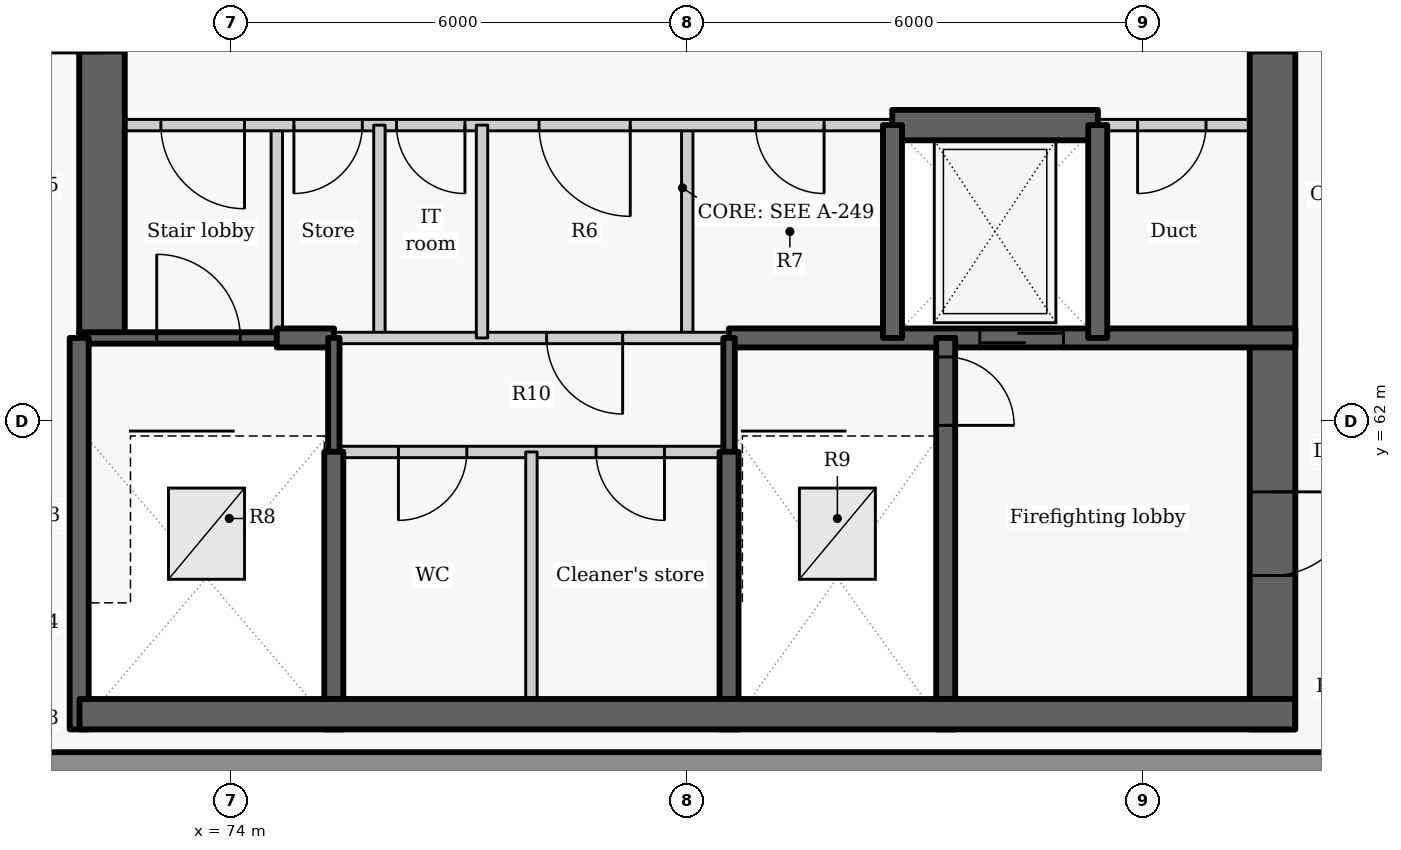
"""IFC4 building model, lengths in metres.
Left out: names, types, materials, properties, quantities, classifications, styles, units other than length and angle.
Written with IfcOpenShell. Run it as: python <this file> out.ifc"""

import sys

from ifc_helpers import new_model, si_unit, direction, frame, frame_2d, origin, origin_2d, place, context, subcontext, project, spatial, rectangle, extrude, element, fill, save


model = new_model("IFC4")
c1 = context("Model", 3, precision=1e-05, world=origin(), true_north=direction((0.0, 1.0)))
c2 = subcontext(c1, "Body", "Model", "MODEL_VIEW")
j1 = project(units=[si_unit("LENGTHUNIT", "METRE"), si_unit("PLANEANGLEUNIT", "RADIAN")], contexts=[c1])
p1 = place(None, origin())
s1 = spatial("IfcSite", under=j1, at=p1, CompositionType="ELEMENT")
p2 = place(p1, origin())
s2 = spatial("IfcBuilding", under=s1, at=p2, CompositionType="ELEMENT")
p3 = place(p2, frame((0.0, 0.0, 286.8)))
s3 = spatial("IfcBuildingStorey", under=s2, at=p3, CompositionType="ELEMENT", Elevation=286.8)
p4 = place(p3, frame((70.451, 57.5, 0.0), z_axis=(0.0, 0.0, 1.0), x_axis=(1.0, 0.0, 0.0)))
e1 = element("IfcWall", 1, at=p4, inside=s3, PredefinedType="SOLIDWALL", context=c2, shape_type="SweptSolid", body=[
    extrude(rectangle(XDim=19.093, YDim=0.3, at=frame_2d((9.546, 0.0))), origin(), (0.0, 0.0, 1.0), 2.725),
])
p5 = place(p3, frame((74.6, 63.1, 0.0), z_axis=(0.0, 0.0, 1.0), x_axis=(0.0, 1.0, 0.0)))
e2 = element("IfcWall", 2, at=p5, inside=s3, PredefinedType="PARTITIONING", context=c2, shape_type="SweptSolid", body=[
    extrude(rectangle(XDim=2.8, YDim=0.15, at=frame_2d((1.4, 0.0))), origin(), (0.0, 0.0, 1.0), 3.325),
])
p6 = place(p3, frame((72.3, 63.1, -0.275), z_axis=(0.0, 0.0, 1.0), x_axis=(0.0, 1.0, 0.0)))
e3 = element("IfcWall", 3, at=p6, inside=s3, PredefinedType="SHEAR", context=c2, shape_type="SweptSolid", body=[
    extrude(rectangle(XDim=9.1, YDim=0.6, at=frame_2d((4.55, 0.0))), origin(), (0.0, 0.0, 1.0), 3.6),
])
p7 = place(p6, frame((3.75, 0.0, 0.275)))
e4 = element("IfcOpeningElement", 4, at=p7, cuts=e3, PredefinedType="OPENING", context=c2, shape_type="SweptSolid", body=[
    extrude(rectangle(XDim=1.5, YDim=2.1, at=frame_2d((0.75, 1.05))), frame((0.0, 0.31, 0.0), z_axis=(0.0, -1.0, 0.0), x_axis=(1.0, 0.0, 0.0)), (0.0, 0.0, 1.0), 0.62),
])
p8 = place(p3, frame((80.0, 63.1, 0.0), z_axis=(0.0, 0.0, 1.0), x_axis=(0.0, 1.0, 0.0)))
e5 = element("IfcWall", 5, at=p8, inside=s3, PredefinedType="PARTITIONING", context=c2, shape_type="SweptSolid", body=[
    extrude(rectangle(XDim=2.8, YDim=0.15, at=frame_2d((1.4, 0.0))), origin(), (0.0, 0.0, 1.0), 3.325),
])
p9 = place(p3, frame((82.703, 65.9, 0.0), z_axis=(0.0, 0.0, 1.0), x_axis=(-1.0, 0.0, 0.0)))
e6 = element("IfcWall", 6, at=p9, inside=s3, PredefinedType="PARTITIONING", context=c2, shape_type="SweptSolid", body=[
    extrude(rectangle(XDim=10.703, YDim=0.15, at=frame_2d((5.352, 0.0))), origin(), (0.0, 0.0, 1.0), 3.325),
])
p10 = place(p9, frame((8.528, 0.0, 0.0)))
e7 = element("IfcOpeningElement", 7, at=p10, cuts=e6, PredefinedType="OPENING", context=c2, shape_type="SweptSolid", body=[
    extrude(rectangle(XDim=1.1, YDim=2.1, at=frame_2d((0.55, 1.05))), frame((0.0, 0.085, 0.0), z_axis=(0.0, -1.0, 0.0), x_axis=(1.0, 0.0, 0.0)), (0.0, 0.0, 1.0), 0.17),
])
p11 = place(p9, frame((6.978, 0.0, 0.0)))
e8 = element("IfcOpeningElement", 8, at=p11, cuts=e6, PredefinedType="OPENING", context=c2, shape_type="SweptSolid", body=[
    extrude(rectangle(XDim=0.9, YDim=2.1, at=frame_2d((0.45, 1.05))), frame((0.0, 0.085, 0.0), z_axis=(0.0, -1.0, 0.0), x_axis=(1.0, 0.0, 0.0)), (0.0, 0.0, 1.0), 0.17),
])
p12 = place(p9, frame((5.628, 0.0, 0.0)))
e9 = element("IfcOpeningElement", 9, at=p12, cuts=e6, PredefinedType="OPENING", context=c2, shape_type="SweptSolid", body=[
    extrude(rectangle(XDim=0.9, YDim=2.1, at=frame_2d((0.45, 1.05))), frame((0.0, 0.085, 0.0), z_axis=(0.0, -1.0, 0.0), x_axis=(1.0, 0.0, 0.0)), (0.0, 0.0, 1.0), 0.17),
])
p13 = place(p9, frame((3.453, 0.0, 0.0)))
e10 = element("IfcOpeningElement", 10, at=p13, cuts=e6, PredefinedType="OPENING", context=c2, shape_type="SweptSolid", body=[
    extrude(rectangle(XDim=1.2, YDim=2.1, at=frame_2d((0.6, 1.05))), frame((0.0, 0.085, 0.0), z_axis=(0.0, -1.0, 0.0), x_axis=(1.0, 0.0, 0.0)), (0.0, 0.0, 1.0), 0.17),
])
p14 = place(p9, frame((0.903, 0.0, 0.0)))
e11 = element("IfcOpeningElement", 11, at=p14, cuts=e6, PredefinedType="OPENING", context=c2, shape_type="SweptSolid", body=[
    extrude(rectangle(XDim=0.9, YDim=2.1, at=frame_2d((0.45, 1.05))), frame((0.0, 0.085, 0.0), z_axis=(0.0, -1.0, 0.0), x_axis=(1.0, 0.0, 0.0)), (0.0, 0.0, 1.0), 0.17),
])
p15 = place(p3, frame((88.0, 65.9, 0.0), z_axis=(0.0, 0.0, 1.0), x_axis=(-1.0, 0.0, 0.0)))
e12 = element("IfcWall", 12, at=p15, inside=s3, PredefinedType="PARTITIONING", context=c2, shape_type="SweptSolid", body=[
    extrude(rectangle(XDim=2.603, YDim=0.15, at=frame_2d((1.302, 0.0))), origin(), (0.0, 0.0, 1.0), 3.325),
])
p16 = place(p15, frame((1.175, 0.0, 0.0)))
e13 = element("IfcOpeningElement", 13, at=p16, cuts=e12, PredefinedType="OPENING", context=c2, shape_type="SweptSolid", body=[
    extrude(rectangle(XDim=0.9, YDim=2.1, at=frame_2d((0.45, 1.05))), frame((0.0, 0.085, 0.0), z_axis=(0.0, -1.0, 0.0), x_axis=(1.0, 0.0, 0.0)), (0.0, 0.0, 1.0), 0.17),
])
p17 = place(p3, frame((82.697, 65.9, -0.275), z_axis=(0.0, 0.0, 1.0), x_axis=(1.0, 0.0, 0.0)))
e14 = element("IfcWall", 14, at=p17, inside=s3, PredefinedType="SHEAR", context=c2, shape_type="SweptSolid", body=[
    extrude(rectangle(XDim=2.706, YDim=0.4, at=frame_2d((1.353, 0.0))), origin(), (0.0, 0.0, 1.0), 3.6),
])
p18 = place(p3, frame((87.7, 69.3, -0.275), z_axis=(0.0, 0.0, 1.0), x_axis=(0.0, -1.0, 0.0)))
e15 = element("IfcWall", 15, at=p18, inside=s3, PredefinedType="SHEAR", context=c2, shape_type="SweptSolid", body=[
    extrude(rectangle(XDim=11.35, YDim=0.6, at=frame_2d((5.675, 0.0))), origin(), (0.0, 0.0, 1.0), 3.6),
])
p19 = place(p18, frame((0.95, 0.0, 0.275)))
e16 = element("IfcOpeningElement", 16, at=p19, cuts=e15, PredefinedType="OPENING", context=c2, shape_type="SweptSolid", body=[
    extrude(rectangle(XDim=1.5, YDim=2.1, at=frame_2d((0.75, 1.05))), frame((0.0, 0.31, 0.0), z_axis=(0.0, -1.0, 0.0), x_axis=(1.0, 0.0, 0.0)), (0.0, 0.0, 1.0), 0.62),
])
p20 = place(p18, frame((8.225, 0.0, 0.275)))
e17 = element("IfcOpeningElement", 17, at=p20, cuts=e15, PredefinedType="OPENING", context=c2, shape_type="SweptSolid", body=[
    extrude(rectangle(XDim=1.1, YDim=2.1, at=frame_2d((0.55, 1.05))), frame((0.0, 0.31, 0.0), z_axis=(0.0, -1.0, 0.0), x_axis=(1.0, 0.0, 0.0)), (0.0, 0.0, 1.0), 0.62),
])
p21 = place(p3, frame((72.0, 63.1, -0.275), z_axis=(0.0, 0.0, 1.0), x_axis=(1.0, 0.0, 0.0)))
e18 = element("IfcWall", 18, at=p21, inside=s3, PredefinedType="SHEAR", context=c2, shape_type="SweptSolid", body=[
    extrude(rectangle(XDim=2.6, YDim=0.15, at=frame_2d((1.3, 0.0))), origin(), (0.0, 0.0, 1.0), 3.6),
])
p22 = place(p21, frame((1.02, 0.0, 0.275)))
e19 = element("IfcOpeningElement", 19, at=p22, cuts=e18, PredefinedType="OPENING", context=c2, shape_type="SweptSolid", body=[
    extrude(rectangle(XDim=1.1, YDim=2.1, at=frame_2d((0.55, 1.05))), frame((0.0, 0.085, 0.0), z_axis=(0.0, -1.0, 0.0), x_axis=(1.0, 0.0, 0.0)), (0.0, 0.0, 1.0), 0.17),
])
p23 = place(p3, frame((75.95, 63.1, 0.0), z_axis=(0.0, 0.0, 1.0), x_axis=(0.0, 1.0, 0.0)))
e20 = element("IfcWall", 20, at=p23, inside=s3, PredefinedType="PARTITIONING", context=c2, shape_type="SweptSolid", body=[
    extrude(rectangle(XDim=2.8, YDim=0.15, at=frame_2d((1.4, 0.0))), origin(), (0.0, 0.0, 1.0), 3.325),
])
p24 = place(p3, frame((74.6, 63.1, -0.275), z_axis=(0.0, 0.0, 1.0), x_axis=(1.0, 0.0, 0.0)))
e21 = element("IfcWall", 21, at=p24, inside=s3, PredefinedType="SHEAR", context=c2, shape_type="SweptSolid", body=[
    extrude(rectangle(XDim=0.753, YDim=0.25, at=frame_2d((0.376, 0.0))), origin(), (0.0, 0.0, 1.0), 3.6),
])
p25 = place(p3, frame((80.547, 63.1, -0.275), z_axis=(0.0, 0.0, 1.0), x_axis=(1.0, 0.0, 0.0)))
e22 = element("IfcWall", 22, at=p25, inside=s3, PredefinedType="SHEAR", context=c2, shape_type="SweptSolid", body=[
    extrude(rectangle(XDim=7.453, YDim=0.25, at=frame_2d((3.727, 0.0))), origin(), (0.0, 0.0, 1.0), 3.6),
])
p26 = place(p25, frame((3.302, 0.0, 0.275)))
e23 = element("IfcOpeningElement", 23, at=p26, cuts=e22, PredefinedType="OPENING", context=c2, shape_type="SweptSolid", body=[
    extrude(rectangle(XDim=1.1, YDim=2.1, at=frame_2d((0.55, 1.05))), frame((0.0, 0.135, 0.0), z_axis=(0.0, -1.0, 0.0), x_axis=(1.0, 0.0, 0.0)), (0.0, 0.0, 1.0), 0.27),
])
p27 = place(p3, frame((80.553, 63.1, 0.0), z_axis=(0.0, 0.0, 1.0), x_axis=(-1.0, 0.0, 0.0)))
e24 = element("IfcWall", 24, at=p27, inside=s3, PredefinedType="PARTITIONING", context=c2, shape_type="SweptSolid", body=[
    extrude(rectangle(XDim=5.206, YDim=0.15, at=frame_2d((2.603, 0.0))), origin(), (0.0, 0.0, 1.0), 3.325),
])
p28 = place(p27, frame((1.403, 0.0, 0.0)))
e25 = element("IfcOpeningElement", 25, at=p28, cuts=e24, PredefinedType="OPENING", context=c2, shape_type="SweptSolid", body=[
    extrude(rectangle(XDim=1.0, YDim=2.1, at=frame_2d((0.5, 1.05))), frame((0.0, 0.085, 0.0), z_axis=(0.0, -1.0, 0.0), x_axis=(1.0, 0.0, 0.0)), (0.0, 0.0, 1.0), 0.17),
])
p29 = place(p3, frame((77.3, 63.1, 0.0), z_axis=(0.0, 0.0, 1.0), x_axis=(0.0, 1.0, 0.0)))
e26 = element("IfcWall", 26, at=p29, inside=s3, PredefinedType="PARTITIONING", context=c2, shape_type="SweptSolid", body=[
    extrude(rectangle(XDim=2.8, YDim=0.15, at=frame_2d((1.4, 0.0))), origin(), (0.0, 0.0, 1.0), 3.325),
])
for number, where, z_axis, x_axis in (
    (27, (82.7, 63.1, -0.275), (0.0, 0.0, 1.0), (0.0, 1.0, 0.0)),
    (28, (85.4, 63.1, -0.275), (0.0, 0.0, 1.0), (0.0, 1.0, 0.0)),
):
    element("IfcWall", number, at=place(p3, frame(where, z_axis=z_axis, x_axis=x_axis)), inside=s3, PredefinedType="SHEAR", context=c2, shape_type="SweptSolid", body=[
        extrude(rectangle(XDim=2.8, YDim=0.25, at=frame_2d((1.4, 0.0))), origin(), (0.0, 0.0, 1.0), 3.6),
    ])
p30 = place(p3, frame((75.35, 61.597, -0.275), z_axis=(0.0, 0.0, 1.0), x_axis=(0.0, 1.0, 0.0)))
e29 = element("IfcWall", 29, at=p30, inside=s3, PredefinedType="SHEAR", context=c2, shape_type="SweptSolid", body=[
    extrude(rectangle(XDim=1.503, YDim=0.15, at=frame_2d((0.751, 0.0))), origin(), (0.0, 0.0, 1.0), 3.6),
])
p31 = place(p3, frame((75.35, 57.95, -0.275), z_axis=(0.0, 0.0, 1.0), x_axis=(0.0, 1.0, 0.0)))
e30 = element("IfcWall", 30, at=p31, inside=s3, PredefinedType="SHEAR", context=c2, shape_type="SweptSolid", body=[
    extrude(rectangle(XDim=3.653, YDim=0.25, at=frame_2d((1.827, 0.0))), origin(), (0.0, 0.0, 1.0), 3.6),
])
p32 = place(p3, frame((72.0, 57.95, -0.275), z_axis=(0.0, 0.0, 1.0), x_axis=(0.0, 1.0, 0.0)))
e31 = element("IfcWall", 31, at=p32, inside=s3, PredefinedType="SHEAR", context=c2, shape_type="SweptSolid", body=[
    extrude(rectangle(XDim=5.15, YDim=0.25, at=frame_2d((2.575, 0.0))), origin(), (0.0, 0.0, 1.0), 3.6),
])
p33 = place(p3, frame((83.4, 63.1, -0.275), z_axis=(0.0, 0.0, 1.0), x_axis=(0.0, -1.0, 0.0)))
e32 = element("IfcWall", 32, at=p33, inside=s3, PredefinedType="SHEAR", context=c2, shape_type="SweptSolid", body=[
    extrude(rectangle(XDim=5.15, YDim=0.25, at=frame_2d((2.575, 0.0))), origin(), (0.0, 0.0, 1.0), 3.6),
])
p34 = place(p33, frame((0.25, 0.0, 0.275)))
e33 = element("IfcOpeningElement", 33, at=p34, cuts=e32, PredefinedType="OPENING", context=c2, shape_type="SweptSolid", body=[
    extrude(rectangle(XDim=0.9, YDim=2.1, at=frame_2d((0.45, 1.05))), frame((0.0, 0.135, 0.0), z_axis=(0.0, -1.0, 0.0), x_axis=(1.0, 0.0, 0.0)), (0.0, 0.0, 1.0), 0.27),
])
p35 = place(p3, frame((80.55, 61.597, -0.275), z_axis=(0.0, 0.0, 1.0), x_axis=(0.0, 1.0, 0.0)))
e34 = element("IfcWall", 34, at=p35, inside=s3, PredefinedType="SHEAR", context=c2, shape_type="SweptSolid", body=[
    extrude(rectangle(XDim=1.503, YDim=0.15, at=frame_2d((0.751, 0.0))), origin(), (0.0, 0.0, 1.0), 3.6),
])
p36 = place(p3, frame((80.55, 57.95, -0.275), z_axis=(0.0, 0.0, 1.0), x_axis=(0.0, 1.0, 0.0)))
e35 = element("IfcWall", 35, at=p36, inside=s3, PredefinedType="SHEAR", context=c2, shape_type="SweptSolid", body=[
    extrude(rectangle(XDim=3.653, YDim=0.25, at=frame_2d((1.827, 0.0))), origin(), (0.0, 0.0, 1.0), 3.6),
])
p37 = place(p3, frame((80.55, 61.6, 0.0), z_axis=(0.0, 0.0, 1.0), x_axis=(-1.0, 0.0, 0.0)))
e36 = element("IfcWall", 36, at=p37, inside=s3, PredefinedType="PARTITIONING", context=c2, shape_type="SweptSolid", body=[
    extrude(rectangle(XDim=5.2, YDim=0.15, at=frame_2d((2.6, 0.0))), origin(), (0.0, 0.0, 1.0), 3.325),
])
p38 = place(p37, frame((3.45, 0.0, 0.0)))
e37 = element("IfcOpeningElement", 37, at=p38, cuts=e36, PredefinedType="OPENING", context=c2, shape_type="SweptSolid", body=[
    extrude(rectangle(XDim=0.9, YDim=2.1, at=frame_2d((0.45, 1.05))), frame((0.0, 0.085, 0.0), z_axis=(0.0, -1.0, 0.0), x_axis=(1.0, 0.0, 0.0)), (0.0, 0.0, 1.0), 0.17),
])
p39 = place(p37, frame((0.85, 0.0, 0.0)))
e38 = element("IfcOpeningElement", 38, at=p39, cuts=e36, PredefinedType="OPENING", context=c2, shape_type="SweptSolid", body=[
    extrude(rectangle(XDim=0.9, YDim=2.1, at=frame_2d((0.45, 1.05))), frame((0.0, 0.085, 0.0), z_axis=(0.0, -1.0, 0.0), x_axis=(1.0, 0.0, 0.0)), (0.0, 0.0, 1.0), 0.17),
])
p40 = place(p3, frame((77.95, 57.95, 0.0), z_axis=(0.0, 0.0, 1.0), x_axis=(0.0, 1.0, 0.0)))
e39 = element("IfcWall", 39, at=p40, inside=s3, PredefinedType="PARTITIONING", context=c2, shape_type="SweptSolid", body=[
    extrude(rectangle(XDim=3.65, YDim=0.15, at=frame_2d((1.825, 0.0))), origin(), (0.0, 0.0, 1.0), 3.325),
])
p41 = place(p3, frame((72.004, 58.15, -0.275), z_axis=(0.0, 0.0, 1.0), x_axis=(1.0, 0.0, 0.0)))
e40 = element("IfcWall", 40, at=p41, inside=s3, PredefinedType="SHEAR", context=c2, shape_type="SweptSolid", body=[
    extrude(rectangle(XDim=15.992, YDim=0.4, at=frame_2d((7.996, 0.0))), origin(), (0.0, 0.0, 1.0), 3.6),
])
p42 = place(p2, frame((0.0, 0.0, 290.4)))
p43 = place(p42, frame((0.0, 0.0, -0.275)))
p44 = place(p43, frame((73.675, 60.525, 0.0)))
p45 = place(p44, frame((0.0, 0.0, 0.225)))
e41 = element("IfcDoor", 41, at=p45, inside=s3, OperationType="SINGLE_SWING_LEFT", PredefinedType="TRAPDOOR", context=c2, shape_type="SweptSolid", body=[
    extrude(rectangle(XDim=1.0, YDim=1.2, at=origin_2d()), origin(), (0.0, 0.0, 1.0), 0.05),
])
p46 = place(p43, frame((81.975, 60.525, 0.0)))
p47 = place(p46, frame((0.0, 0.0, 0.225)))
e42 = element("IfcDoor", 42, at=p47, inside=s3, OperationType="SINGLE_SWING_LEFT", PredefinedType="TRAPDOOR", context=c2, shape_type="SweptSolid", body=[
    extrude(rectangle(XDim=1.0, YDim=1.2, at=origin_2d()), origin(), (0.0, 0.0, 1.0), 0.05),
])
p48 = place(p10, origin())
e43 = element("IfcDoor", 43, at=p48, inside=s3, OperationType="SINGLE_SWING_LEFT", PredefinedType="DOOR", context=c2, shape_type="SweptSolid", body=[
    extrude(rectangle(XDim=1.1, YDim=2.1, at=frame_2d((0.55, 1.05))), frame((0.0, 0.025, 0.0), z_axis=(0.0, -1.0, 0.0), x_axis=(1.0, 0.0, 0.0)), (0.0, 0.0, 1.0), 0.05),
])
fill(e7, e43)
p49 = place(p11, origin())
e44 = element("IfcDoor", 44, at=p49, inside=s3, OperationType="SINGLE_SWING_RIGHT", PredefinedType="DOOR", context=c2, shape_type="SweptSolid", body=[
    extrude(rectangle(XDim=0.9, YDim=2.1, at=frame_2d((0.45, 1.05))), frame((0.0, 0.025, 0.0), z_axis=(0.0, -1.0, 0.0), x_axis=(1.0, 0.0, 0.0)), (0.0, 0.0, 1.0), 0.05),
])
fill(e8, e44)
p50 = place(p12, origin())
e45 = element("IfcDoor", 45, at=p50, inside=s3, OperationType="SINGLE_SWING_LEFT", PredefinedType="DOOR", context=c2, shape_type="SweptSolid", body=[
    extrude(rectangle(XDim=0.9, YDim=2.1, at=frame_2d((0.45, 1.05))), frame((0.0, 0.025, 0.0), z_axis=(0.0, -1.0, 0.0), x_axis=(1.0, 0.0, 0.0)), (0.0, 0.0, 1.0), 0.05),
])
fill(e9, e45)
p51 = place(p13, origin())
e46 = element("IfcDoor", 46, at=p51, inside=s3, OperationType="DOUBLE_DOOR_SINGLE_SWING", PredefinedType="DOOR", context=c2, shape_type="SweptSolid", body=[
    extrude(rectangle(XDim=1.2, YDim=2.1, at=frame_2d((0.6, 1.05))), frame((0.0, 0.025, 0.0), z_axis=(0.0, -1.0, 0.0), x_axis=(1.0, 0.0, 0.0)), (0.0, 0.0, 1.0), 0.05),
])
fill(e10, e46)
p52 = place(p14, origin())
e47 = element("IfcDoor", 47, at=p52, inside=s3, OperationType="SINGLE_SWING_LEFT", PredefinedType="DOOR", context=c2, shape_type="SweptSolid", body=[
    extrude(rectangle(XDim=0.9, YDim=2.1, at=frame_2d((0.45, 1.05))), frame((0.0, 0.025, 0.0), z_axis=(0.0, -1.0, 0.0), x_axis=(1.0, 0.0, 0.0)), (0.0, 0.0, 1.0), 0.05),
])
fill(e11, e47)
p53 = place(p26, origin())
e48 = element("IfcDoor", 48, at=p53, inside=s3, OperationType="SLIDING_TO_LEFT", PredefinedType="DOOR", context=c2, shape_type="SweptSolid", body=[
    extrude(rectangle(XDim=1.1, YDim=2.1, at=frame_2d((0.55, 1.05))), frame((0.0, 0.025, 0.0), z_axis=(0.0, -1.0, 0.0), x_axis=(1.0, 0.0, 0.0)), (0.0, 0.0, 1.0), 0.05),
])
fill(e23, e48)
p54 = place(p16, origin())
e49 = element("IfcDoor", 49, at=p54, inside=s3, OperationType="SINGLE_SWING_RIGHT", PredefinedType="DOOR", context=c2, shape_type="SweptSolid", body=[
    extrude(rectangle(XDim=0.9, YDim=2.1, at=frame_2d((0.45, 1.05))), frame((0.0, 0.025, 0.0), z_axis=(0.0, -1.0, 0.0), x_axis=(1.0, 0.0, 0.0)), (0.0, 0.0, 1.0), 0.05),
])
fill(e13, e49)
p55 = place(p28, origin())
e50 = element("IfcDoor", 50, at=p55, inside=s3, OperationType="SINGLE_SWING_LEFT", PredefinedType="DOOR", context=c2, shape_type="SweptSolid", body=[
    extrude(rectangle(XDim=1.0, YDim=2.1, at=frame_2d((0.5, 1.05))), frame((0.0, 0.025, 0.0), z_axis=(0.0, -1.0, 0.0), x_axis=(1.0, 0.0, 0.0)), (0.0, 0.0, 1.0), 0.05),
])
fill(e25, e50)
p56 = place(p38, origin())
e51 = element("IfcDoor", 51, at=p56, inside=s3, OperationType="SINGLE_SWING_RIGHT", PredefinedType="DOOR", context=c2, shape_type="SweptSolid", body=[
    extrude(rectangle(XDim=0.9, YDim=2.1, at=frame_2d((0.45, 1.05))), frame((0.0, 0.025, 0.0), z_axis=(0.0, -1.0, 0.0), x_axis=(1.0, 0.0, 0.0)), (0.0, 0.0, 1.0), 0.05),
])
fill(e37, e51)
p57 = place(p39, origin())
e52 = element("IfcDoor", 52, at=p57, inside=s3, OperationType="SINGLE_SWING_LEFT", PredefinedType="DOOR", context=c2, shape_type="SweptSolid", body=[
    extrude(rectangle(XDim=0.9, YDim=2.1, at=frame_2d((0.45, 1.05))), frame((0.0, 0.025, 0.0), z_axis=(0.0, -1.0, 0.0), x_axis=(1.0, 0.0, 0.0)), (0.0, 0.0, 1.0), 0.05),
])
fill(e38, e52)
p58 = place(p22, origin())
e53 = element("IfcDoor", 53, at=p58, inside=s3, OperationType="SINGLE_SWING_LEFT", PredefinedType="DOOR", context=c2, shape_type="SweptSolid", body=[
    extrude(rectangle(XDim=1.1, YDim=2.1, at=frame_2d((0.55, 1.05))), frame((0.0, 0.025, 0.0), z_axis=(0.0, -1.0, 0.0), x_axis=(1.0, 0.0, 0.0)), (0.0, 0.0, 1.0), 0.05),
])
fill(e19, e53)
p59 = place(p34, origin())
e54 = element("IfcDoor", 54, at=p59, inside=s3, OperationType="SINGLE_SWING_RIGHT", PredefinedType="DOOR", context=c2, shape_type="SweptSolid", body=[
    extrude(rectangle(XDim=0.9, YDim=2.1, at=frame_2d((0.45, 1.05))), frame((0.0, 0.025, 0.0), z_axis=(0.0, -1.0, 0.0), x_axis=(1.0, 0.0, 0.0)), (0.0, 0.0, 1.0), 0.05),
])
fill(e33, e54)
p60 = place(p20, origin())
e55 = element("IfcDoor", 55, at=p60, inside=s3, OperationType="SINGLE_SWING_LEFT", PredefinedType="DOOR", context=c2, shape_type="SweptSolid", body=[
    extrude(rectangle(XDim=1.1, YDim=2.1, at=frame_2d((0.55, 1.05))), frame((0.0, 0.025, 0.0), z_axis=(0.0, -1.0, 0.0), x_axis=(1.0, 0.0, 0.0)), (0.0, 0.0, 1.0), 0.05),
])
fill(e17, e55)
save(model, sys.argv[1])
